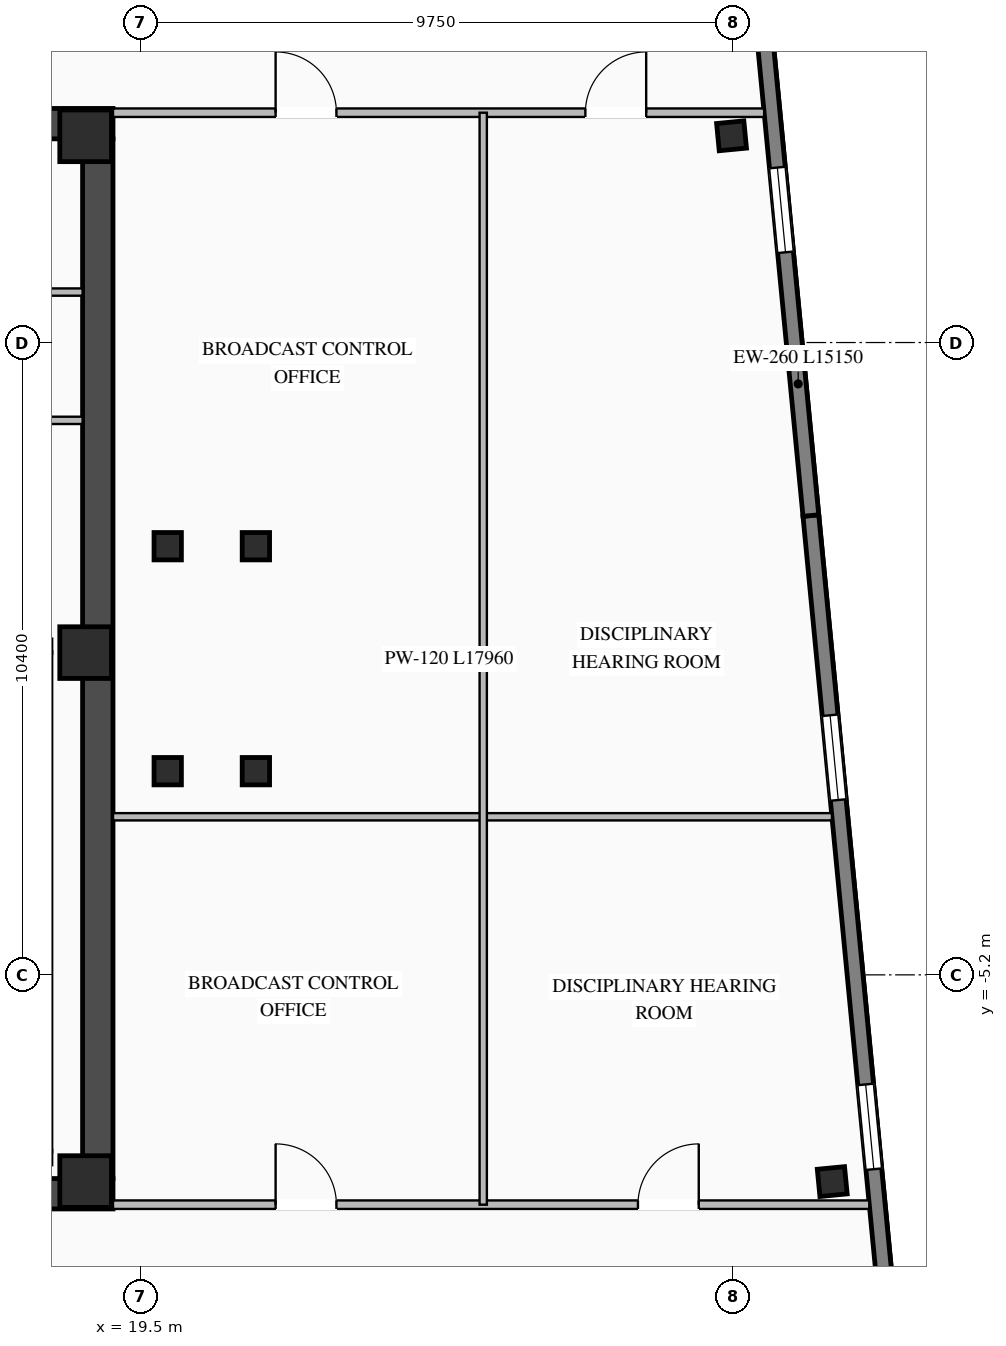
"""IFC4 building model, lengths in metres.
Left out: names, types, materials, properties, quantities, classifications, styles, units other than length and angle.
Written with IfcOpenShell. Run it as: python <this file> out.ifc"""

import sys

from ifc_helpers import new_model, si_unit, direction, frame, frame_2d, origin, origin_2d, place, context, subcontext, project, spatial, rectangle, i_section, extrude, element, fill, save


model = new_model("IFC4")
c1 = context("Model", 3, precision=1e-05, world=origin(), true_north=direction((0.0, 1.0)))
c2 = subcontext(c1, "Body", "Model", "MODEL_VIEW")
j1 = project(units=[si_unit("LENGTHUNIT", "METRE"), si_unit("PLANEANGLEUNIT", "RADIAN")], contexts=[c1])
p1 = place(None, origin())
s1 = spatial("IfcSite", under=j1, at=p1, CompositionType="ELEMENT")
p2 = place(p1, origin())
s2 = spatial("IfcBuilding", under=s1, at=p2, CompositionType="ELEMENT")
p3 = place(p2, frame((0.0, 0.0, 279.3)))
s3 = spatial("IfcBuildingStorey", under=s2, at=p3, CompositionType="ELEMENT", Elevation=279.3)
p4 = place(p3, frame((8.8, -8.8, 0.0), z_axis=(0.0, 0.0, 1.0), x_axis=(1.0, 0.0, 0.0)))
e1 = element("IfcWall", 1, at=p4, inside=s3, PredefinedType="SHEAR", context=c2, shape_type="SweptSolid", body=[
    extrude(rectangle(XDim=10.25, YDim=0.5, at=frame_2d((5.125, 0.0))), origin(), (0.0, 0.0, 1.0), 3.27),
])
p5 = place(p3, frame((8.8, 8.8, 0.0), z_axis=(0.0, 0.0, 1.0), x_axis=(1.0, 0.0, 0.0)))
e2 = element("IfcWall", 2, at=p5, inside=s3, PredefinedType="SHEAR", context=c2, shape_type="SweptSolid", body=[
    extrude(rectangle(XDim=10.25, YDim=0.5, at=frame_2d((5.125, 0.0))), origin(), (0.0, 0.0, 1.0), 3.27),
])
p6 = place(p5, frame((3.25, 0.0, 0.0)))
e3 = element("IfcOpeningElement", 3, at=p6, cuts=e2, PredefinedType="OPENING", context=c2, shape_type="SweptSolid", body=[
    extrude(rectangle(XDim=1.4, YDim=2.05, at=frame_2d((0.7, 1.025))), frame((0.0, 0.26, 0.0), z_axis=(0.0, -1.0, 0.0), x_axis=(1.0, 0.0, 0.0)), (0.0, 0.0, 1.0), 0.52),
])
p7 = place(p3, frame((18.8, -8.55, 0.0), z_axis=(0.0, 0.0, 1.0), x_axis=(0.0, 1.0, 0.0)))
e4 = element("IfcWall", 4, at=p7, inside=s3, PredefinedType="SHEAR", context=c2, shape_type="SweptSolid", body=[
    extrude(rectangle(XDim=17.1, YDim=0.5, at=frame_2d((8.55, 0.0))), origin(), (0.0, 0.0, 1.0), 3.27),
])
for number, where, z_axis, x_axis in (
    (5, (18.6, -8.6, 0.0), (0.0, 0.0, 1.0), (1.0, 0.0, 0.0)),
    (6, (18.6, 0.1, 0.0), (0.0, 0.0, 1.0), (1.0, 0.0, 0.0)),
    (7, (18.6, 8.6, 0.0), (0.0, 0.0, 1.0), (1.0, 0.0, 0.0)),
):
    element("IfcColumn", number, at=place(p3, frame(where, z_axis=z_axis, x_axis=x_axis)), inside=s3, PredefinedType="COLUMN", context=c2, shape_type="SweptSolid", body=[
        extrude(rectangle(XDim=0.85, YDim=0.85, at=origin_2d()), origin(), (0.0, 0.0, 1.0), 3.45),
    ])
for number, where, z_axis, x_axis in (
    (8, (19.95, -1.85, 0.0), (0.0, 0.0, 1.0), (1.0, 0.0, 0.0)),
    (9, (19.95, 1.85, 0.0), (0.0, 0.0, 1.0), (1.0, 0.0, 0.0)),
    (10, (21.4, -1.85, 0.0), (0.0, 0.0, 1.0), (1.0, 0.0, 0.0)),
    (11, (21.4, 1.85, 0.0), (0.0, 0.0, 1.0), (1.0, 0.0, 0.0)),
    (12, (30.879, -8.6, 0.0), (0.0, 0.0, 1.0), (0.995, 0.096, 0.0)),
    (13, (29.223, 8.6, 0.0), (0.0, 0.0, 1.0), (0.995, 0.096, 0.0)),
):
    element("IfcColumn", number, at=place(p3, frame(where, z_axis=z_axis, x_axis=x_axis)), inside=s3, PredefinedType="COLUMN", context=c2, shape_type="SweptSolid", body=[
        extrude(i_section(OverallWidth=0.45, OverallDepth=0.45, WebThickness=0.022, FlangeThickness=0.032, at=origin_2d()), origin(), (0.0, 0.0, 1.0), 3.45),
    ])
p8 = place(p3, frame((30.527, 2.354, 0.0), z_axis=(0.0, 0.0, 1.0), x_axis=(0.095850890337, -0.995395703638, 0.0)))
e14 = element("IfcWall", 14, at=p8, inside=s3, PredefinedType="STANDARD", context=c2, shape_type="SweptSolid", body=[
    extrude(rectangle(XDim=15.15, YDim=0.26, at=frame_2d((7.575, 0.0))), origin(), (0.0, 0.0, 1.0), 3.25),
])
p9 = place(p8, frame((3.3, 0.0, 0.76)))
e15 = element("IfcOpeningElement", 15, at=p9, cuts=e14, PredefinedType="OPENING", context=c2, shape_type="SweptSolid", body=[
    extrude(rectangle(XDim=1.4, YDim=1.95, at=frame_2d((0.7, 0.975))), frame((0.0, 0.14, 0.0), z_axis=(0.0, -1.0, 0.0), x_axis=(1.0, 0.0, 0.0)), (0.0, 0.0, 1.0), 0.28),
])
p10 = place(p8, frame((9.4, 0.0, 0.76)))
e16 = element("IfcOpeningElement", 16, at=p10, cuts=e14, PredefinedType="OPENING", context=c2, shape_type="SweptSolid", body=[
    extrude(rectangle(XDim=1.4, YDim=1.95, at=frame_2d((0.7, 0.975))), frame((0.0, 0.14, 0.0), z_axis=(0.0, -1.0, 0.0), x_axis=(1.0, 0.0, 0.0)), (0.0, 0.0, 1.0), 0.28),
])
p11 = place(p3, frame((29.075, 17.435, 0.0), z_axis=(0.0, 0.0, 1.0), x_axis=(0.095850890337, -0.995395703638, 0.0)))
e17 = element("IfcWall", 17, at=p11, inside=s3, PredefinedType="STANDARD", context=c2, shape_type="SweptSolid", body=[
    extrude(rectangle(XDim=15.15, YDim=0.26, at=frame_2d((7.575, 0.0))), origin(), (0.0, 0.0, 1.0), 3.25),
])
p12 = place(p11, frame((3.8, 0.0, 0.76)))
e18 = element("IfcOpeningElement", 18, at=p12, cuts=e17, PredefinedType="OPENING", context=c2, shape_type="SweptSolid", body=[
    extrude(rectangle(XDim=1.4, YDim=1.95, at=frame_2d((0.7, 0.975))), frame((0.0, 0.14, 0.0), z_axis=(0.0, -1.0, 0.0), x_axis=(1.0, 0.0, 0.0)), (0.0, 0.0, 1.0), 0.28),
])
p13 = place(p11, frame((9.4, 0.0, 0.76)))
e19 = element("IfcOpeningElement", 19, at=p13, cuts=e17, PredefinedType="OPENING", context=c2, shape_type="SweptSolid", body=[
    extrude(rectangle(XDim=1.4, YDim=1.95, at=frame_2d((0.7, 0.975))), frame((0.0, 0.14, 0.0), z_axis=(0.0, -1.0, 0.0), x_axis=(1.0, 0.0, 0.0)), (0.0, 0.0, 1.0), 0.28),
])
p14 = place(p3, frame((13.9, 3.92, 0.0), z_axis=(0.0, 0.0, 1.0), x_axis=(1.0, 0.0, 0.0)))
e20 = element("IfcWall", 20, at=p14, inside=s3, PredefinedType="STANDARD", context=c2, shape_type="SweptSolid", body=[
    extrude(rectangle(XDim=4.65, YDim=0.12, at=frame_2d((2.325, 0.0))), origin(), (0.0, 0.0, 1.0), 3.25),
])
p15 = place(p3, frame((16.15, 6.03, 0.0), z_axis=(0.0, 0.0, 1.0), x_axis=(1.0, 0.0, 0.0)))
e21 = element("IfcWall", 21, at=p15, inside=s3, PredefinedType="STANDARD", context=c2, shape_type="SweptSolid", body=[
    extrude(rectangle(XDim=2.4, YDim=0.12, at=frame_2d((1.2, 0.0))), origin(), (0.0, 0.0, 1.0), 3.25),
])
p16 = place(p3, frame((19.05, 8.98, 0.0), z_axis=(0.0, 0.0, 1.0), x_axis=(1.0, 0.0, 0.0)))
e22 = element("IfcWall", 22, at=p16, inside=s3, PredefinedType="STANDARD", context=c2, shape_type="SweptSolid", body=[
    extrude(rectangle(XDim=10.709, YDim=0.14, at=frame_2d((5.354, 0.0))), origin(), (0.0, 0.0, 1.0), 3.25),
])
p17 = place(p16, frame((2.675, 0.0, 0.0)))
e23 = element("IfcOpeningElement", 23, at=p17, cuts=e22, PredefinedType="OPENING", context=c2, shape_type="SweptSolid", body=[
    extrude(rectangle(XDim=1.0, YDim=2.08, at=frame_2d((0.5, 1.04))), frame((0.0, 0.08, 0.0), z_axis=(0.0, -1.0, 0.0), x_axis=(1.0, 0.0, 0.0)), (0.0, 0.0, 1.0), 0.16),
])
p18 = place(p16, frame((7.769, 0.0, 0.0)))
e24 = element("IfcOpeningElement", 24, at=p18, cuts=e22, PredefinedType="OPENING", context=c2, shape_type="SweptSolid", body=[
    extrude(rectangle(XDim=1.0, YDim=2.08, at=frame_2d((0.5, 1.04))), frame((0.0, 0.08, 0.0), z_axis=(0.0, -1.0, 0.0), x_axis=(1.0, 0.0, 0.0)), (0.0, 0.0, 1.0), 0.16),
])
p19 = place(p3, frame((19.05, -8.98, 0.0), z_axis=(0.0, 0.0, 1.0), x_axis=(1.0, 0.0, 0.0)))
e25 = element("IfcWall", 25, at=p19, inside=s3, PredefinedType="STANDARD", context=c2, shape_type="SweptSolid", body=[
    extrude(rectangle(XDim=12.438, YDim=0.14, at=frame_2d((6.219, 0.0))), origin(), (0.0, 0.0, 1.0), 3.25),
])
p20 = place(p19, frame((2.675, 0.0, 0.0)))
e26 = element("IfcOpeningElement", 26, at=p20, cuts=e25, PredefinedType="OPENING", context=c2, shape_type="SweptSolid", body=[
    extrude(rectangle(XDim=1.0, YDim=2.08, at=frame_2d((0.5, 1.04))), frame((0.0, 0.08, 0.0), z_axis=(0.0, -1.0, 0.0), x_axis=(1.0, 0.0, 0.0)), (0.0, 0.0, 1.0), 0.16),
])
p21 = place(p19, frame((8.634, 0.0, 0.0)))
e27 = element("IfcOpeningElement", 27, at=p21, cuts=e25, PredefinedType="OPENING", context=c2, shape_type="SweptSolid", body=[
    extrude(rectangle(XDim=1.0, YDim=2.08, at=frame_2d((0.5, 1.04))), frame((0.0, 0.08, 0.0), z_axis=(0.0, -1.0, 0.0), x_axis=(1.0, 0.0, 0.0)), (0.0, 0.0, 1.0), 0.16),
])
p22 = place(p3, frame((19.05, -2.6, 0.0), z_axis=(0.0, 0.0, 1.0), x_axis=(1.0, 0.0, 0.0)))
e28 = element("IfcWall", 28, at=p22, inside=s3, PredefinedType="STANDARD", context=c2, shape_type="SweptSolid", body=[
    extrude(rectangle(XDim=11.824, YDim=0.12, at=frame_2d((5.912, 0.0))), origin(), (0.0, 0.0, 1.0), 3.25),
])
p23 = place(p3, frame((25.139, -8.98, 0.0), z_axis=(0.0, 0.0, 1.0), x_axis=(0.0, 1.0, 0.0)))
e29 = element("IfcWall", 29, at=p23, inside=s3, PredefinedType="STANDARD", context=c2, shape_type="SweptSolid", body=[
    extrude(rectangle(XDim=17.96, YDim=0.12, at=frame_2d((8.98, 0.0))), origin(), (0.0, 0.0, 1.0), 3.25),
])
p24 = place(p9, origin())
e30 = element("IfcWindow", 30, at=p24, inside=s3, PartitioningType="SINGLE_PANEL", PredefinedType="WINDOW", context=c2, shape_type="SweptSolid", body=[
    extrude(rectangle(XDim=1.4, YDim=1.95, at=frame_2d((0.7, 0.975))), frame((0.0, 0.03, 0.0), z_axis=(0.0, -1.0, 0.0), x_axis=(1.0, 0.0, 0.0)), (0.0, 0.0, 1.0), 0.06),
])
fill(e15, e30)
p25 = place(p10, origin())
e31 = element("IfcWindow", 31, at=p25, inside=s3, PartitioningType="SINGLE_PANEL", PredefinedType="WINDOW", context=c2, shape_type="SweptSolid", body=[
    extrude(rectangle(XDim=1.4, YDim=1.95, at=frame_2d((0.7, 0.975))), frame((0.0, 0.03, 0.0), z_axis=(0.0, -1.0, 0.0), x_axis=(1.0, 0.0, 0.0)), (0.0, 0.0, 1.0), 0.06),
])
fill(e16, e31)
p26 = place(p13, origin())
e32 = element("IfcWindow", 32, at=p26, inside=s3, PartitioningType="SINGLE_PANEL", PredefinedType="WINDOW", context=c2, shape_type="SweptSolid", body=[
    extrude(rectangle(XDim=1.4, YDim=1.95, at=frame_2d((0.7, 0.975))), frame((0.0, 0.03, 0.0), z_axis=(0.0, -1.0, 0.0), x_axis=(1.0, 0.0, 0.0)), (0.0, 0.0, 1.0), 0.06),
])
fill(e19, e32)
p27 = place(p17, origin())
e33 = element("IfcDoor", 33, at=p27, inside=s3, OperationType="SINGLE_SWING_LEFT", PredefinedType="DOOR", context=c2, shape_type="SweptSolid", body=[
    extrude(rectangle(XDim=1.0, YDim=2.08, at=frame_2d((0.5, 1.04))), frame((0.0, 0.025, 0.0), z_axis=(0.0, -1.0, 0.0), x_axis=(1.0, 0.0, 0.0)), (0.0, 0.0, 1.0), 0.05),
])
fill(e23, e33)
p28 = place(p18, origin())
e34 = element("IfcDoor", 34, at=p28, inside=s3, OperationType="SINGLE_SWING_RIGHT", PredefinedType="DOOR", context=c2, shape_type="SweptSolid", body=[
    extrude(rectangle(XDim=1.0, YDim=2.08, at=frame_2d((0.5, 1.04))), frame((0.0, 0.025, 0.0), z_axis=(0.0, -1.0, 0.0), x_axis=(1.0, 0.0, 0.0)), (0.0, 0.0, 1.0), 0.05),
])
fill(e24, e34)
p29 = place(p20, origin())
e35 = element("IfcDoor", 35, at=p29, inside=s3, OperationType="SINGLE_SWING_LEFT", PredefinedType="DOOR", context=c2, shape_type="SweptSolid", body=[
    extrude(rectangle(XDim=1.0, YDim=2.08, at=frame_2d((0.5, 1.04))), frame((0.0, 0.025, 0.0), z_axis=(0.0, -1.0, 0.0), x_axis=(1.0, 0.0, 0.0)), (0.0, 0.0, 1.0), 0.05),
])
fill(e26, e35)
p30 = place(p21, origin())
e36 = element("IfcDoor", 36, at=p30, inside=s3, OperationType="SINGLE_SWING_RIGHT", PredefinedType="DOOR", context=c2, shape_type="SweptSolid", body=[
    extrude(rectangle(XDim=1.0, YDim=2.08, at=frame_2d((0.5, 1.04))), frame((0.0, 0.025, 0.0), z_axis=(0.0, -1.0, 0.0), x_axis=(1.0, 0.0, 0.0)), (0.0, 0.0, 1.0), 0.05),
])
fill(e27, e36)
save(model, sys.argv[1])
